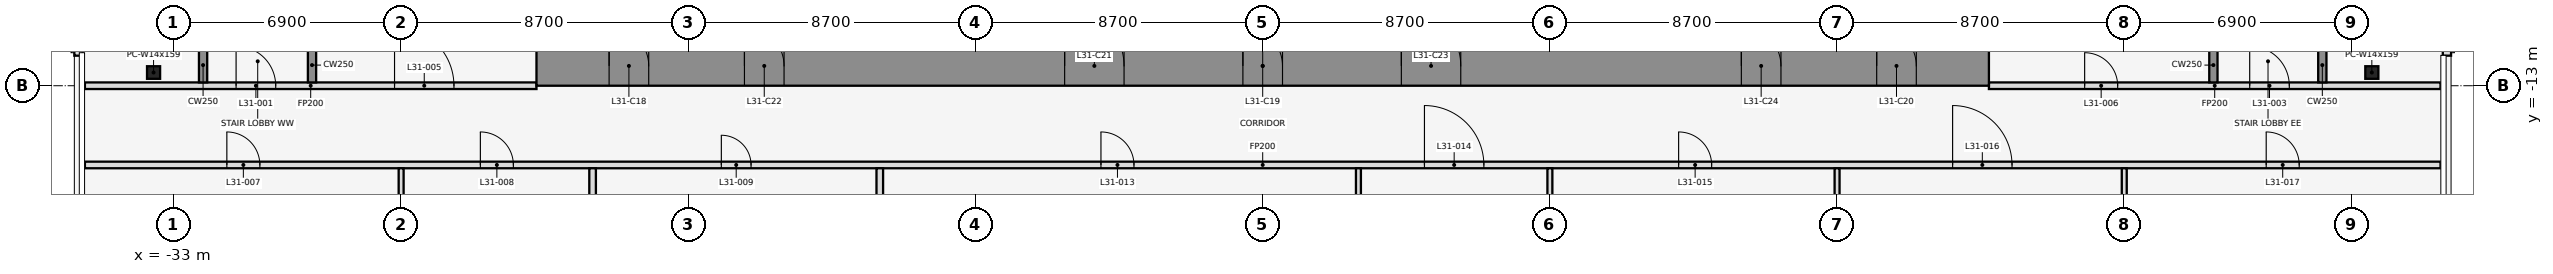
"""IFC4 building model, lengths in metres.
Left out: names, types, materials, properties, quantities, classifications, styles, units other than length and angle.
Written with IfcOpenShell. Run it as: python <this file> out.ifc"""

import sys

from ifc_helpers import new_model, si_unit, direction, frame, frame_2d, origin, origin_2d, place, context, subcontext, project, spatial, rectangle, i_section, extrude, element, fill, save


model = new_model("IFC4")
c1 = context("Model", 3, precision=1e-05, world=origin(), true_north=direction((0.0, 1.0)))
c2 = subcontext(c1, "Body", "Model", "MODEL_VIEW")
j1 = project(units=[si_unit("LENGTHUNIT", "METRE"), si_unit("PLANEANGLEUNIT", "RADIAN")], contexts=[c1])
p1 = place(None, origin())
s1 = spatial("IfcSite", under=j1, at=p1, CompositionType="ELEMENT")
p2 = place(p1, origin())
s2 = spatial("IfcBuilding", under=s1, at=p2, CompositionType="ELEMENT")
p3 = place(p2, frame((0.0, 0.0, 144.5)))
s3 = spatial("IfcBuildingStorey", under=s2, at=p3, CompositionType="ELEMENT", Elevation=144.5)
for number, where, z_axis, x_axis in (
    (1, (-33.6, -12.6, 0.0), (0.0, 0.0, 1.0), (1.0, 0.0, 0.0)),
    (2, (33.6, -12.6, 0.0), (0.0, 0.0, 1.0), (1.0, 0.0, 0.0)),
):
    element("IfcColumn", number, at=place(p3, frame(where, z_axis=z_axis, x_axis=x_axis)), inside=s3, PredefinedType="COLUMN", context=c2, shape_type="SweptSolid", body=[
        extrude(i_section(OverallWidth=0.396, OverallDepth=0.381, WebThickness=0.019, FlangeThickness=0.03, at=origin_2d()), origin(), (0.0, 0.0, 1.0), 4.1),
    ])
for number, where, z_axis, x_axis in (
    (3, (-35.875, -3.0, 0.0), (0.0, 0.0, 1.0), (0.0, -1.0, 0.0)),
    (4, (35.875, -12.09, 0.0), (0.0, 0.0, 1.0), (0.0, 1.0, 0.0)),
):
    element("IfcWall", number, at=place(p3, frame(where, z_axis=z_axis, x_axis=x_axis)), inside=s3, PredefinedType="STANDARD", context=c2, shape_type="SweptSolid", body=[
        extrude(rectangle(XDim=9.09, YDim=0.25, at=frame_2d((4.545, 0.0))), origin(), (0.0, 0.0, 1.0), 3.95),
    ])
p4 = place(p3, frame((-35.68, -15.4, 0.0), z_axis=(0.0, 0.0, 1.0), x_axis=(1.0, 0.0, 0.0)))
e5 = element("IfcWall", 5, at=p4, inside=s3, PredefinedType="PARTITIONING", context=c2, shape_type="SweptSolid", body=[
    extrude(rectangle(XDim=71.36, YDim=0.2, at=frame_2d((35.68, 0.0))), origin(), (0.0, 0.0, 1.0), 2.84),
])
p5 = place(p4, frame((4.3, 0.0, 0.0)))
e6 = element("IfcOpeningElement", 6, at=p5, cuts=e5, PredefinedType="OPENING", context=c2, shape_type="SweptSolid", body=[
    extrude(rectangle(XDim=1.0, YDim=2.1, at=frame_2d((0.5, 1.05))), frame((0.0, 0.112, 0.0), z_axis=(0.0, -1.0, 0.0), x_axis=(1.0, 0.0, 0.0)), (0.0, 0.0, 1.0), 0.224),
])
p6 = place(p4, frame((11.98, 0.0, 0.0)))
e7 = element("IfcOpeningElement", 7, at=p6, cuts=e5, PredefinedType="OPENING", context=c2, shape_type="SweptSolid", body=[
    extrude(rectangle(XDim=1.0, YDim=2.1, at=frame_2d((0.5, 1.05))), frame((0.0, 0.112, 0.0), z_axis=(0.0, -1.0, 0.0), x_axis=(1.0, 0.0, 0.0)), (0.0, 0.0, 1.0), 0.224),
])
p7 = place(p4, frame((19.28, 0.0, 0.0)))
e8 = element("IfcOpeningElement", 8, at=p7, cuts=e5, PredefinedType="OPENING", context=c2, shape_type="SweptSolid", body=[
    extrude(rectangle(XDim=0.9, YDim=2.1, at=frame_2d((0.45, 1.05))), frame((0.0, 0.112, 0.0), z_axis=(0.0, -1.0, 0.0), x_axis=(1.0, 0.0, 0.0)), (0.0, 0.0, 1.0), 0.224),
])
p8 = place(p4, frame((30.78, 0.0, 0.0)))
e9 = element("IfcOpeningElement", 9, at=p8, cuts=e5, PredefinedType="OPENING", context=c2, shape_type="SweptSolid", body=[
    extrude(rectangle(XDim=1.0, YDim=2.1, at=frame_2d((0.5, 1.05))), frame((0.0, 0.112, 0.0), z_axis=(0.0, -1.0, 0.0), x_axis=(1.0, 0.0, 0.0)), (0.0, 0.0, 1.0), 0.224),
])
p9 = place(p4, frame((40.58, 0.0, 0.0)))
e10 = element("IfcOpeningElement", 10, at=p9, cuts=e5, PredefinedType="OPENING", context=c2, shape_type="SweptSolid", body=[
    extrude(rectangle(XDim=1.8, YDim=2.1, at=frame_2d((0.9, 1.05))), frame((0.0, 0.112, 0.0), z_axis=(0.0, -1.0, 0.0), x_axis=(1.0, 0.0, 0.0)), (0.0, 0.0, 1.0), 0.224),
])
p10 = place(p4, frame((48.28, 0.0, 0.0)))
e11 = element("IfcOpeningElement", 11, at=p10, cuts=e5, PredefinedType="OPENING", context=c2, shape_type="SweptSolid", body=[
    extrude(rectangle(XDim=1.0, YDim=2.1, at=frame_2d((0.5, 1.05))), frame((0.0, 0.112, 0.0), z_axis=(0.0, -1.0, 0.0), x_axis=(1.0, 0.0, 0.0)), (0.0, 0.0, 1.0), 0.224),
])
p11 = place(p4, frame((56.58, 0.0, 0.0)))
e12 = element("IfcOpeningElement", 12, at=p11, cuts=e5, PredefinedType="OPENING", context=c2, shape_type="SweptSolid", body=[
    extrude(rectangle(XDim=1.8, YDim=2.1, at=frame_2d((0.9, 1.05))), frame((0.0, 0.112, 0.0), z_axis=(0.0, -1.0, 0.0), x_axis=(1.0, 0.0, 0.0)), (0.0, 0.0, 1.0), 0.224),
])
p12 = place(p4, frame((66.08, 0.0, 0.0)))
e13 = element("IfcOpeningElement", 13, at=p12, cuts=e5, PredefinedType="OPENING", context=c2, shape_type="SweptSolid", body=[
    extrude(rectangle(XDim=1.0, YDim=2.1, at=frame_2d((0.5, 1.05))), frame((0.0, 0.112, 0.0), z_axis=(0.0, -1.0, 0.0), x_axis=(1.0, 0.0, 0.0)), (0.0, 0.0, 1.0), 0.224),
])
p13 = place(p3, frame((-35.68, -13.0, 0.0), z_axis=(0.0, 0.0, 1.0), x_axis=(1.0, 0.0, 0.0)))
e14 = element("IfcWall", 14, at=p13, inside=s3, PredefinedType="PARTITIONING", context=c2, shape_type="SweptSolid", body=[
    extrude(rectangle(XDim=13.68, YDim=0.2, at=frame_2d((6.84, 0.0))), origin(), (0.0, 0.0, 1.0), 2.84),
])
p14 = place(p13, frame((4.58, 0.0, 0.0)))
e15 = element("IfcOpeningElement", 15, at=p14, cuts=e14, PredefinedType="OPENING", context=c2, shape_type="SweptSolid", body=[
    extrude(rectangle(XDim=1.2, YDim=2.1, at=frame_2d((0.6, 1.05))), frame((0.0, 0.112, 0.0), z_axis=(0.0, -1.0, 0.0), x_axis=(1.0, 0.0, 0.0)), (0.0, 0.0, 1.0), 0.224),
])
p15 = place(p13, frame((9.38, 0.0, 0.0)))
e16 = element("IfcOpeningElement", 16, at=p15, cuts=e14, PredefinedType="OPENING", context=c2, shape_type="SweptSolid", body=[
    extrude(rectangle(XDim=1.8, YDim=2.1, at=frame_2d((0.9, 1.05))), frame((0.0, 0.112, 0.0), z_axis=(0.0, -1.0, 0.0), x_axis=(1.0, 0.0, 0.0)), (0.0, 0.0, 1.0), 0.224),
])
p16 = place(p3, frame((22.0, -13.0, 0.0), z_axis=(0.0, 0.0, 1.0), x_axis=(1.0, 0.0, 0.0)))
e17 = element("IfcWall", 17, at=p16, inside=s3, PredefinedType="PARTITIONING", context=c2, shape_type="SweptSolid", body=[
    extrude(rectangle(XDim=13.68, YDim=0.2, at=frame_2d((6.84, 0.0))), origin(), (0.0, 0.0, 1.0), 2.84),
])
p17 = place(p16, frame((7.9, 0.0, 0.0)))
e18 = element("IfcOpeningElement", 18, at=p17, cuts=e17, PredefinedType="OPENING", context=c2, shape_type="SweptSolid", body=[
    extrude(rectangle(XDim=1.2, YDim=2.1, at=frame_2d((0.6, 1.05))), frame((0.0, 0.112, 0.0), z_axis=(0.0, -1.0, 0.0), x_axis=(1.0, 0.0, 0.0)), (0.0, 0.0, 1.0), 0.224),
])
p18 = place(p16, frame((2.9, 0.0, 0.0)))
e19 = element("IfcOpeningElement", 19, at=p18, cuts=e17, PredefinedType="OPENING", context=c2, shape_type="SweptSolid", body=[
    extrude(rectangle(XDim=1.0, YDim=2.1, at=frame_2d((0.5, 1.05))), frame((0.0, 0.112, 0.0), z_axis=(0.0, -1.0, 0.0), x_axis=(1.0, 0.0, 0.0)), (0.0, 0.0, 1.0), 0.224),
])
for number, where, z_axis, x_axis in (
    (20, (-32.1, -12.9, 0.0), (0.0, 0.0, 1.0), (0.0, 1.0, 0.0)),
    (21, (-28.8, -12.9, 0.0), (0.0, 0.0, 1.0), (0.0, 1.0, 0.0)),
):
    element("IfcWall", number, at=place(p3, frame(where, z_axis=z_axis, x_axis=x_axis)), inside=s3, PredefinedType="SHEAR", context=c2, shape_type="SweptSolid", body=[
        extrude(rectangle(XDim=1.05, YDim=0.25, at=frame_2d((0.525, 0.0))), origin(), (0.0, 0.0, 1.0), 4.1),
    ])
p19 = place(p3, frame((-26.1, -35.69, 0.0), z_axis=(0.0, 0.0, 1.0), x_axis=(0.0, 1.0, 0.0)))
e22 = element("IfcWall", 22, at=p19, inside=s3, PredefinedType="PARTITIONING", context=c2, shape_type="SweptSolid", body=[
    extrude(rectangle(XDim=20.19, YDim=0.15, at=frame_2d((10.095, 0.0))), origin(), (0.0, 0.0, 1.0), 2.84),
])
p20 = place(p3, frame((-20.3, -35.69, 0.0), z_axis=(0.0, 0.0, 1.0), x_axis=(0.0, 1.0, 0.0)))
e23 = element("IfcWall", 23, at=p20, inside=s3, PredefinedType="PARTITIONING", context=c2, shape_type="SweptSolid", body=[
    extrude(rectangle(XDim=20.19, YDim=0.2, at=frame_2d((10.095, 0.0))), origin(), (0.0, 0.0, 1.0), 2.84),
])
p21 = place(p3, frame((-11.6, -21.725, 0.0), z_axis=(0.0, 0.0, 1.0), x_axis=(0.0, 1.0, 0.0)))
e24 = element("IfcWall", 24, at=p21, inside=s3, PredefinedType="PARTITIONING", context=c2, shape_type="SweptSolid", body=[
    extrude(rectangle(XDim=6.225, YDim=0.2, at=frame_2d((3.113, 0.0))), origin(), (0.0, 0.0, 1.0), 2.84),
])
p22 = place(p3, frame((2.9, -37.37, 0.0), z_axis=(0.0, 0.0, 1.0), x_axis=(0.0, 1.0, 0.0)))
e25 = element("IfcWall", 25, at=p22, inside=s3, PredefinedType="PARTITIONING", context=c2, shape_type="SweptSolid", body=[
    extrude(rectangle(XDim=21.87, YDim=0.15, at=frame_2d((10.935, 0.0))), origin(), (0.0, 0.0, 1.0), 2.84),
])
p23 = place(p3, frame((8.7, -39.338, 0.0), z_axis=(0.0, 0.0, 1.0), x_axis=(0.0, 1.0, 0.0)))
e26 = element("IfcWall", 26, at=p23, inside=s3, PredefinedType="PARTITIONING", context=c2, shape_type="SweptSolid", body=[
    extrude(rectangle(XDim=23.838, YDim=0.15, at=frame_2d((11.919, 0.0))), origin(), (0.0, 0.0, 1.0), 2.84),
])
for number, where, z_axis, x_axis in (
    (27, (17.4, -35.69, 0.0), (0.0, 0.0, 1.0), (0.0, 1.0, 0.0)),
    (28, (26.1, -35.69, 0.0), (0.0, 0.0, 1.0), (0.0, 1.0, 0.0)),
):
    element("IfcWall", number, at=place(p3, frame(where, z_axis=z_axis, x_axis=x_axis)), inside=s3, PredefinedType="PARTITIONING", context=c2, shape_type="SweptSolid", body=[
        extrude(rectangle(XDim=20.19, YDim=0.15, at=frame_2d((10.095, 0.0))), origin(), (0.0, 0.0, 1.0), 2.84),
    ])
for number, where, z_axis, x_axis in (
    (29, (28.8, -12.9, 0.0), (0.0, 0.0, 1.0), (0.0, 1.0, 0.0)),
    (30, (32.1, -12.9, 0.0), (0.0, 0.0, 1.0), (0.0, 1.0, 0.0)),
):
    element("IfcWall", number, at=place(p3, frame(where, z_axis=z_axis, x_axis=x_axis)), inside=s3, PredefinedType="SHEAR", context=c2, shape_type="SweptSolid", body=[
        extrude(rectangle(XDim=1.05, YDim=0.25, at=frame_2d((0.525, 0.0))), origin(), (0.0, 0.0, 1.0), 4.1),
    ])
p24 = place(p3, frame((-22.0, -12.4, 0.0), z_axis=(0.0, 0.0, 1.0), x_axis=(1.0, 0.0, 0.0)))
e31 = element("IfcWall", 31, at=p24, inside=s3, PredefinedType="SHEAR", context=c2, shape_type="SweptSolid", body=[
    extrude(rectangle(XDim=44.0, YDim=1.2, at=frame_2d((22.0, 0.0))), origin(), (0.0, 0.0, 1.0), 4.1),
])
p25 = place(p24, frame((2.2, 0.0, 0.0)))
e32 = element("IfcOpeningElement", 32, at=p25, cuts=e31, PredefinedType="OPENING", context=c2, shape_type="SweptSolid", body=[
    extrude(rectangle(XDim=1.2, YDim=2.1, at=frame_2d((0.6, 1.05))), frame((0.0, 0.612, 0.0), z_axis=(0.0, -1.0, 0.0), x_axis=(1.0, 0.0, 0.0)), (0.0, 0.0, 1.0), 1.224),
])
p26 = place(p24, frame((21.4, 0.0, 0.0)))
e33 = element("IfcOpeningElement", 33, at=p26, cuts=e31, PredefinedType="OPENING", context=c2, shape_type="SweptSolid", body=[
    extrude(rectangle(XDim=1.2, YDim=2.1, at=frame_2d((0.6, 1.05))), frame((0.0, 0.612, 0.0), z_axis=(0.0, -1.0, 0.0), x_axis=(1.0, 0.0, 0.0)), (0.0, 0.0, 1.0), 1.224),
])
p27 = place(p24, frame((40.6, 0.0, 0.0)))
e34 = element("IfcOpeningElement", 34, at=p27, cuts=e31, PredefinedType="OPENING", context=c2, shape_type="SweptSolid", body=[
    extrude(rectangle(XDim=1.2, YDim=2.1, at=frame_2d((0.6, 1.05))), frame((0.0, 0.612, 0.0), z_axis=(0.0, -1.0, 0.0), x_axis=(1.0, 0.0, 0.0)), (0.0, 0.0, 1.0), 1.224),
])
p28 = place(p24, frame((16.0, 0.0, 0.0)))
e35 = element("IfcOpeningElement", 35, at=p28, cuts=e31, PredefinedType="OPENING", context=c2, shape_type="SweptSolid", body=[
    extrude(rectangle(XDim=1.8, YDim=2.1, at=frame_2d((0.9, 1.05))), frame((0.0, 0.612, 0.0), z_axis=(0.0, -1.0, 0.0), x_axis=(1.0, 0.0, 0.0)), (0.0, 0.0, 1.0), 1.224),
])
p29 = place(p24, frame((6.3, 0.0, 0.0)))
e36 = element("IfcOpeningElement", 36, at=p29, cuts=e31, PredefinedType="OPENING", context=c2, shape_type="SweptSolid", body=[
    extrude(rectangle(XDim=1.2, YDim=2.1, at=frame_2d((0.6, 1.05))), frame((0.0, 0.612, 0.0), z_axis=(0.0, -1.0, 0.0), x_axis=(1.0, 0.0, 0.0)), (0.0, 0.0, 1.0), 1.224),
])
p30 = place(p24, frame((26.2, 0.0, 0.0)))
e37 = element("IfcOpeningElement", 37, at=p30, cuts=e31, PredefinedType="OPENING", context=c2, shape_type="SweptSolid", body=[
    extrude(rectangle(XDim=1.8, YDim=2.1, at=frame_2d((0.9, 1.05))), frame((0.0, 0.612, 0.0), z_axis=(0.0, -1.0, 0.0), x_axis=(1.0, 0.0, 0.0)), (0.0, 0.0, 1.0), 1.224),
])
p31 = place(p24, frame((36.5, 0.0, 0.0)))
e38 = element("IfcOpeningElement", 38, at=p31, cuts=e31, PredefinedType="OPENING", context=c2, shape_type="SweptSolid", body=[
    extrude(rectangle(XDim=1.2, YDim=2.1, at=frame_2d((0.6, 1.05))), frame((0.0, 0.612, 0.0), z_axis=(0.0, -1.0, 0.0), x_axis=(1.0, 0.0, 0.0)), (0.0, 0.0, 1.0), 1.224),
])
p32 = place(p14, origin())
e39 = element("IfcDoor", 39, at=p32, inside=s3, OperationType="SINGLE_SWING_LEFT", PredefinedType="DOOR", context=c2, shape_type="SweptSolid", body=[
    extrude(rectangle(XDim=1.2, YDim=2.1, at=frame_2d((0.6, 1.05))), frame((0.0, 0.025, 0.0), z_axis=(0.0, -1.0, 0.0), x_axis=(1.0, 0.0, 0.0)), (0.0, 0.0, 1.0), 0.05),
])
fill(e15, e39)
p33 = place(p17, origin())
e40 = element("IfcDoor", 40, at=p33, inside=s3, OperationType="SINGLE_SWING_RIGHT", PredefinedType="DOOR", context=c2, shape_type="SweptSolid", body=[
    extrude(rectangle(XDim=1.2, YDim=2.1, at=frame_2d((0.6, 1.05))), frame((0.0, 0.025, 0.0), z_axis=(0.0, -1.0, 0.0), x_axis=(1.0, 0.0, 0.0)), (0.0, 0.0, 1.0), 0.05),
])
fill(e18, e40)
p34 = place(p15, origin())
e41 = element("IfcDoor", 41, at=p34, inside=s3, OperationType="SINGLE_SWING_LEFT", PredefinedType="DOOR", context=c2, shape_type="SweptSolid", body=[
    extrude(rectangle(XDim=1.8, YDim=2.1, at=frame_2d((0.9, 1.05))), frame((0.0, 0.025, 0.0), z_axis=(0.0, -1.0, 0.0), x_axis=(1.0, 0.0, 0.0)), (0.0, 0.0, 1.0), 0.05),
])
fill(e16, e41)
p35 = place(p18, origin())
e42 = element("IfcDoor", 42, at=p35, inside=s3, OperationType="SINGLE_SWING_RIGHT", PredefinedType="DOOR", context=c2, shape_type="SweptSolid", body=[
    extrude(rectangle(XDim=1.0, YDim=2.1, at=frame_2d((0.5, 1.05))), frame((0.0, 0.025, 0.0), z_axis=(0.0, -1.0, 0.0), x_axis=(1.0, 0.0, 0.0)), (0.0, 0.0, 1.0), 0.05),
])
fill(e19, e42)
p36 = place(p5, frame((1.0, 0.0, 0.0), z_axis=(0.0, 0.0, 1.0), x_axis=(-1.0, 0.0, 0.0)))
e43 = element("IfcDoor", 43, at=p36, inside=s3, OperationType="SINGLE_SWING_LEFT", PredefinedType="DOOR", context=c2, shape_type="SweptSolid", body=[
    extrude(rectangle(XDim=1.0, YDim=2.1, at=frame_2d((0.5, 1.05))), frame((0.0, 0.025, 0.0), z_axis=(0.0, -1.0, 0.0), x_axis=(1.0, 0.0, 0.0)), (0.0, 0.0, 1.0), 0.05),
])
fill(e6, e43)
p37 = place(p6, frame((1.0, 0.0, 0.0), z_axis=(0.0, 0.0, 1.0), x_axis=(-1.0, 0.0, 0.0)))
e44 = element("IfcDoor", 44, at=p37, inside=s3, OperationType="SINGLE_SWING_RIGHT", PredefinedType="DOOR", context=c2, shape_type="SweptSolid", body=[
    extrude(rectangle(XDim=1.0, YDim=2.1, at=frame_2d((0.5, 1.05))), frame((0.0, 0.025, 0.0), z_axis=(0.0, -1.0, 0.0), x_axis=(1.0, 0.0, 0.0)), (0.0, 0.0, 1.0), 0.05),
])
fill(e7, e44)
p38 = place(p7, frame((0.9, 0.0, 0.0), z_axis=(0.0, 0.0, 1.0), x_axis=(-1.0, 0.0, 0.0)))
e45 = element("IfcDoor", 45, at=p38, inside=s3, OperationType="SINGLE_SWING_RIGHT", PredefinedType="DOOR", context=c2, shape_type="SweptSolid", body=[
    extrude(rectangle(XDim=0.9, YDim=2.1, at=frame_2d((0.45, 1.05))), frame((0.0, 0.025, 0.0), z_axis=(0.0, -1.0, 0.0), x_axis=(1.0, 0.0, 0.0)), (0.0, 0.0, 1.0), 0.05),
])
fill(e8, e45)
p39 = place(p8, frame((1.0, 0.0, 0.0), z_axis=(0.0, 0.0, 1.0), x_axis=(-1.0, 0.0, 0.0)))
e46 = element("IfcDoor", 46, at=p39, inside=s3, OperationType="SINGLE_SWING_LEFT", PredefinedType="DOOR", context=c2, shape_type="SweptSolid", body=[
    extrude(rectangle(XDim=1.0, YDim=2.1, at=frame_2d((0.5, 1.05))), frame((0.0, 0.025, 0.0), z_axis=(0.0, -1.0, 0.0), x_axis=(1.0, 0.0, 0.0)), (0.0, 0.0, 1.0), 0.05),
])
fill(e9, e46)
p40 = place(p9, origin())
e47 = element("IfcDoor", 47, at=p40, inside=s3, OperationType="SINGLE_SWING_LEFT", PredefinedType="DOOR", context=c2, shape_type="SweptSolid", body=[
    extrude(rectangle(XDim=1.8, YDim=2.1, at=frame_2d((0.9, 1.05))), frame((0.0, 0.025, 0.0), z_axis=(0.0, -1.0, 0.0), x_axis=(1.0, 0.0, 0.0)), (0.0, 0.0, 1.0), 0.05),
])
fill(e10, e47)
p41 = place(p10, frame((1.0, 0.0, 0.0), z_axis=(0.0, 0.0, 1.0), x_axis=(-1.0, 0.0, 0.0)))
e48 = element("IfcDoor", 48, at=p41, inside=s3, OperationType="SINGLE_SWING_RIGHT", PredefinedType="DOOR", context=c2, shape_type="SweptSolid", body=[
    extrude(rectangle(XDim=1.0, YDim=2.1, at=frame_2d((0.5, 1.05))), frame((0.0, 0.025, 0.0), z_axis=(0.0, -1.0, 0.0), x_axis=(1.0, 0.0, 0.0)), (0.0, 0.0, 1.0), 0.05),
])
fill(e11, e48)
p42 = place(p11, origin())
e49 = element("IfcDoor", 49, at=p42, inside=s3, OperationType="SINGLE_SWING_LEFT", PredefinedType="DOOR", context=c2, shape_type="SweptSolid", body=[
    extrude(rectangle(XDim=1.8, YDim=2.1, at=frame_2d((0.9, 1.05))), frame((0.0, 0.025, 0.0), z_axis=(0.0, -1.0, 0.0), x_axis=(1.0, 0.0, 0.0)), (0.0, 0.0, 1.0), 0.05),
])
fill(e12, e49)
p43 = place(p12, frame((1.0, 0.0, 0.0), z_axis=(0.0, 0.0, 1.0), x_axis=(-1.0, 0.0, 0.0)))
e50 = element("IfcDoor", 50, at=p43, inside=s3, OperationType="SINGLE_SWING_RIGHT", PredefinedType="DOOR", context=c2, shape_type="SweptSolid", body=[
    extrude(rectangle(XDim=1.0, YDim=2.1, at=frame_2d((0.5, 1.05))), frame((0.0, 0.025, 0.0), z_axis=(0.0, -1.0, 0.0), x_axis=(1.0, 0.0, 0.0)), (0.0, 0.0, 1.0), 0.05),
])
fill(e13, e50)
p44 = place(p25, frame((1.2, 0.0, 0.0), z_axis=(0.0, 0.0, 1.0), x_axis=(-1.0, 0.0, 0.0)))
e51 = element("IfcDoor", 51, at=p44, inside=s3, OperationType="SINGLE_SWING_RIGHT", PredefinedType="DOOR", context=c2, shape_type="SweptSolid", body=[
    extrude(rectangle(XDim=1.2, YDim=2.1, at=frame_2d((0.6, 1.05))), frame((0.0, 0.025, 0.0), z_axis=(0.0, -1.0, 0.0), x_axis=(1.0, 0.0, 0.0)), (0.0, 0.0, 1.0), 0.05),
])
fill(e32, e51)
p45 = place(p26, frame((1.2, 0.0, 0.0), z_axis=(0.0, 0.0, 1.0), x_axis=(-1.0, 0.0, 0.0)))
e52 = element("IfcDoor", 52, at=p45, inside=s3, OperationType="SINGLE_SWING_RIGHT", PredefinedType="DOOR", context=c2, shape_type="SweptSolid", body=[
    extrude(rectangle(XDim=1.2, YDim=2.1, at=frame_2d((0.6, 1.05))), frame((0.0, 0.025, 0.0), z_axis=(0.0, -1.0, 0.0), x_axis=(1.0, 0.0, 0.0)), (0.0, 0.0, 1.0), 0.05),
])
fill(e33, e52)
p46 = place(p27, frame((1.2, 0.0, 0.0), z_axis=(0.0, 0.0, 1.0), x_axis=(-1.0, 0.0, 0.0)))
e53 = element("IfcDoor", 53, at=p46, inside=s3, OperationType="SINGLE_SWING_RIGHT", PredefinedType="DOOR", context=c2, shape_type="SweptSolid", body=[
    extrude(rectangle(XDim=1.2, YDim=2.1, at=frame_2d((0.6, 1.05))), frame((0.0, 0.025, 0.0), z_axis=(0.0, -1.0, 0.0), x_axis=(1.0, 0.0, 0.0)), (0.0, 0.0, 1.0), 0.05),
])
fill(e34, e53)
p47 = place(p28, origin())
e54 = element("IfcDoor", 54, at=p47, inside=s3, OperationType="SINGLE_SWING_LEFT", PredefinedType="DOOR", context=c2, shape_type="SweptSolid", body=[
    extrude(rectangle(XDim=1.8, YDim=2.1, at=frame_2d((0.9, 1.05))), frame((0.0, 0.025, 0.0), z_axis=(0.0, -1.0, 0.0), x_axis=(1.0, 0.0, 0.0)), (0.0, 0.0, 1.0), 0.05),
])
fill(e35, e54)
p48 = place(p29, frame((1.2, 0.0, 0.0), z_axis=(0.0, 0.0, 1.0), x_axis=(-1.0, 0.0, 0.0)))
e55 = element("IfcDoor", 55, at=p48, inside=s3, OperationType="SINGLE_SWING_RIGHT", PredefinedType="DOOR", context=c2, shape_type="SweptSolid", body=[
    extrude(rectangle(XDim=1.2, YDim=2.1, at=frame_2d((0.6, 1.05))), frame((0.0, 0.025, 0.0), z_axis=(0.0, -1.0, 0.0), x_axis=(1.0, 0.0, 0.0)), (0.0, 0.0, 1.0), 0.05),
])
fill(e36, e55)
p49 = place(p30, origin())
e56 = element("IfcDoor", 56, at=p49, inside=s3, OperationType="SINGLE_SWING_LEFT", PredefinedType="DOOR", context=c2, shape_type="SweptSolid", body=[
    extrude(rectangle(XDim=1.8, YDim=2.1, at=frame_2d((0.9, 1.05))), frame((0.0, 0.025, 0.0), z_axis=(0.0, -1.0, 0.0), x_axis=(1.0, 0.0, 0.0)), (0.0, 0.0, 1.0), 0.05),
])
fill(e37, e56)
p50 = place(p31, frame((1.2, 0.0, 0.0), z_axis=(0.0, 0.0, 1.0), x_axis=(-1.0, 0.0, 0.0)))
e57 = element("IfcDoor", 57, at=p50, inside=s3, OperationType="SINGLE_SWING_RIGHT", PredefinedType="DOOR", context=c2, shape_type="SweptSolid", body=[
    extrude(rectangle(XDim=1.2, YDim=2.1, at=frame_2d((0.6, 1.05))), frame((0.0, 0.025, 0.0), z_axis=(0.0, -1.0, 0.0), x_axis=(1.0, 0.0, 0.0)), (0.0, 0.0, 1.0), 0.05),
])
fill(e38, e57)
save(model, sys.argv[1])
